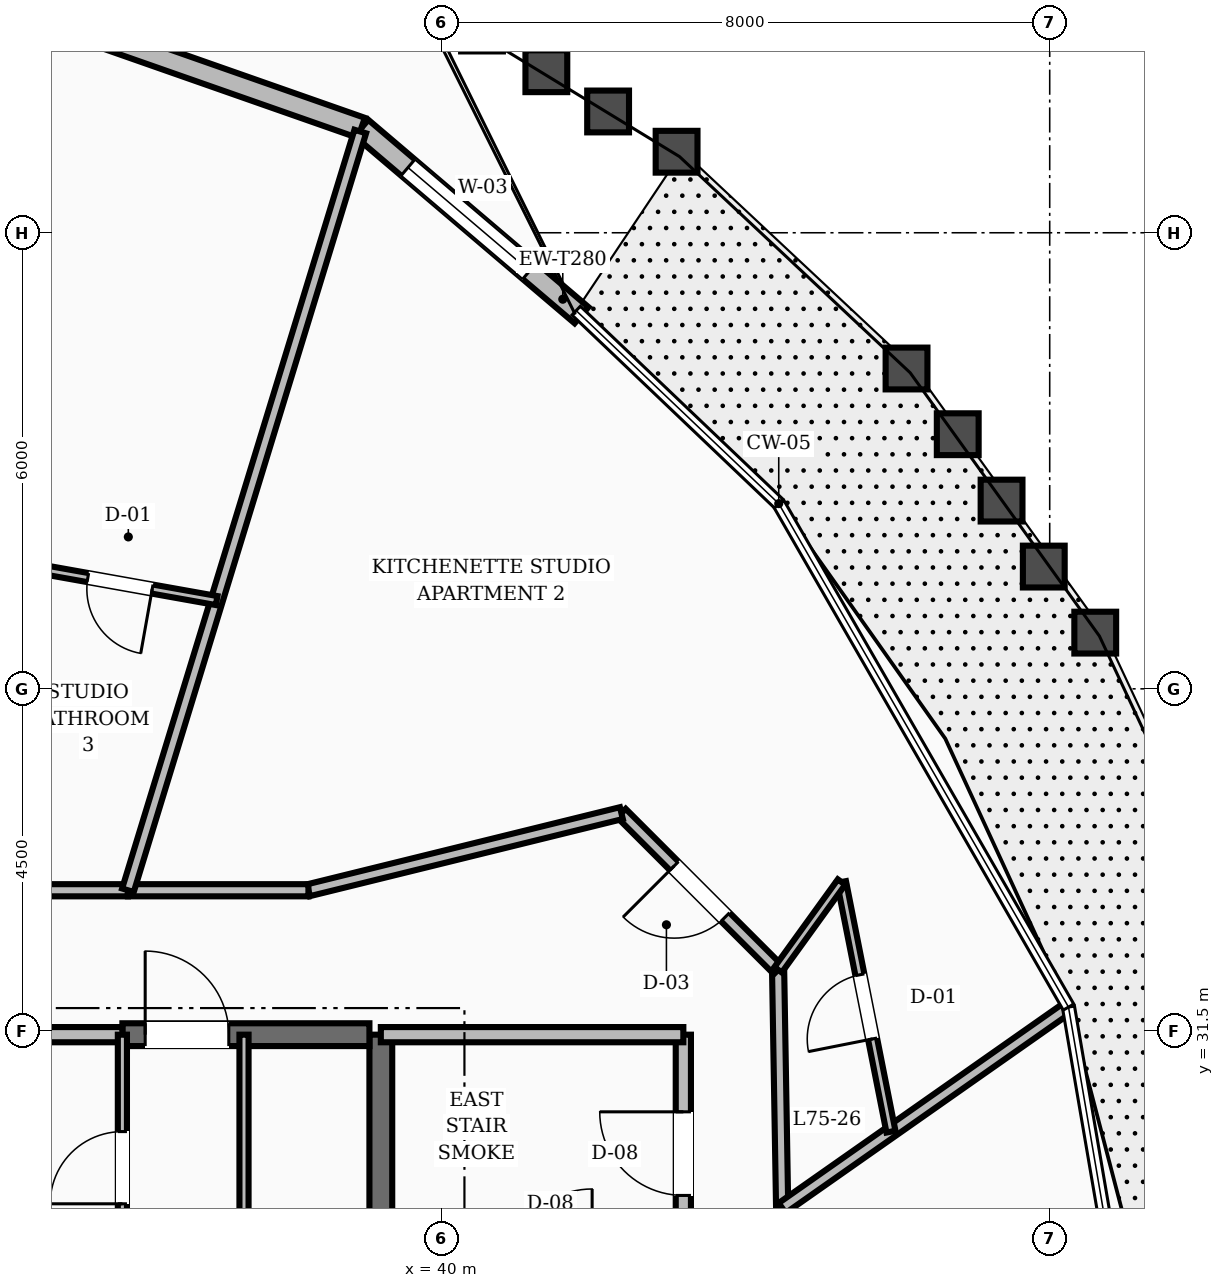
"""IFC4 building model, lengths in metres.
Left out: names, types, materials, properties, quantities, classifications, styles, units other than length and angle.
Written with IfcOpenShell. Run it as: python <this file> out.ifc"""

import sys

from ifc_helpers import new_model, si_unit, direction, frame, frame_2d, origin, place, context, subcontext, project, spatial, rectangle, extrude, element, fill, save


model = new_model("IFC4")
c1 = context("Model", 3, precision=1e-05, world=origin(), true_north=direction((0.0, 1.0)))
c2 = subcontext(c1, "Body", "Model", "MODEL_VIEW")
j1 = project(units=[si_unit("LENGTHUNIT", "METRE"), si_unit("PLANEANGLEUNIT", "RADIAN")], contexts=[c1])
p1 = place(None, origin())
s1 = spatial("IfcSite", under=j1, at=p1, CompositionType="ELEMENT")
p2 = place(p1, origin())
s2 = spatial("IfcBuilding", under=s1, at=p2, CompositionType="ELEMENT")
p3 = place(p2, frame((0.0, 0.0, 286.8)))
s3 = spatial("IfcBuildingStorey", under=s2, at=p3, CompositionType="ELEMENT", Elevation=286.8)
p4 = place(p3, frame((39.2, 25.15, 0.0), z_axis=(0.0, 0.0, 1.0), x_axis=(0.0, 1.0, 0.0)))
e1 = element("IfcWall", 1, at=p4, inside=s3, PredefinedType="SHEAR", context=c2, shape_type="SweptSolid", body=[
    extrude(rectangle(XDim=6.3, YDim=0.3, at=frame_2d((3.15, 0.0))), origin(), (0.0, 0.0, 1.0), 3.6),
])
p5 = place(p3, frame((35.8, 31.45, 0.0), z_axis=(0.0, 0.0, 1.0), x_axis=(1.0, 0.0, 0.0)))
e2 = element("IfcWall", 2, at=p5, inside=s3, PredefinedType="SHEAR", context=c2, shape_type="SweptSolid", body=[
    extrude(rectangle(XDim=3.25, YDim=0.3, at=frame_2d((1.625, 0.0))), origin(), (0.0, 0.0, 1.0), 3.6),
])
p6 = place(p5, frame((0.3, 0.0, 0.0)))
e3 = element("IfcOpeningElement", 3, at=p6, cuts=e2, PredefinedType="OPENING", context=c2, shape_type="SweptSolid", body=[
    extrude(rectangle(XDim=1.1, YDim=2.1, at=frame_2d((0.55, 1.05))), frame((0.0, 0.16, 0.0), z_axis=(0.0, -1.0, 0.0), x_axis=(1.0, 0.0, 0.0)), (0.0, 0.0, 1.0), 0.32),
])
p7 = place(p3, frame((41.84, 40.916, 0.0), z_axis=(0.0, 0.0, 1.0), x_axis=(-0.7617032154, 0.64792608502, 0.0)))
e4 = element("IfcWall", 4, at=p7, inside=s3, PredefinedType="STANDARD", context=c2, shape_type="SweptSolid", body=[
    extrude(rectangle(XDim=3.802, YDim=0.28, at=frame_2d((1.901, 0.0))), origin(), (0.0, 0.0, 1.0), 2.88),
])
p8 = place(p7, frame((0.897, 0.0, 0.8)))
e5 = element("IfcOpeningElement", 5, at=p8, cuts=e4, PredefinedType="OPENING", context=c2, shape_type="SweptSolid", body=[
    extrude(rectangle(XDim=2.1, YDim=1.65, at=frame_2d((1.05, 0.825))), frame((0.0, 0.15, 0.0), z_axis=(0.0, -1.0, 0.0), x_axis=(1.0, 0.0, 0.0)), (0.0, 0.0, 1.0), 0.3),
])
p9 = place(p3, frame((38.944, 43.38, 0.0), z_axis=(0.0, 0.0, 1.0), x_axis=(-0.94366932977, 0.33089000597, 0.0)))
e6 = element("IfcWall", 6, at=p9, inside=s3, PredefinedType="STANDARD", context=c2, shape_type="SweptSolid", body=[
    extrude(rectangle(XDim=3.607, YDim=0.28, at=frame_2d((1.804, 0.0))), origin(), (0.0, 0.0, 1.0), 2.88),
])
p10 = place(p3, frame((43.18, 28.32, 0.0), z_axis=(0.0, 0.0, 1.0), x_axis=(0.0, 1.0, 0.0)))
e7 = element("IfcWall", 7, at=p10, inside=s3, PredefinedType="SOLIDWALL", context=c2, shape_type="SweptSolid", body=[
    extrude(rectangle(XDim=3.13, YDim=0.2, at=frame_2d((1.565, 0.0))), origin(), (0.0, 0.0, 1.0), 2.87),
])
p11 = place(p10, frame((1.015, 0.0, 0.0)))
e8 = element("IfcOpeningElement", 8, at=p11, cuts=e7, PredefinedType="OPENING", context=c2, shape_type="SweptSolid", body=[
    extrude(rectangle(XDim=1.1, YDim=2.1, at=frame_2d((0.55, 1.05))), frame((0.0, 0.11, 0.0), z_axis=(0.0, -1.0, 0.0), x_axis=(1.0, 0.0, 0.0)), (0.0, 0.0, 1.0), 0.22),
])
p12 = place(p3, frame((39.2, 31.45, 0.0), z_axis=(0.0, 0.0, 1.0), x_axis=(1.0, 0.0, 0.0)))
e9 = element("IfcWall", 9, at=p12, inside=s3, PredefinedType="SOLIDWALL", context=c2, shape_type="SweptSolid", body=[
    extrude(rectangle(XDim=3.98, YDim=0.2, at=frame_2d((1.99, 0.0))), origin(), (0.0, 0.0, 1.0), 2.87),
])
p13 = place(p3, frame((28.2, 31.45, 0.0), z_axis=(0.0, 0.0, 1.0), x_axis=(1.0, 0.0, 0.0)))
e10 = element("IfcWall", 10, at=p13, inside=s3, PredefinedType="SOLIDWALL", context=c2, shape_type="SweptSolid", body=[
    extrude(rectangle(XDim=7.6, YDim=0.2, at=frame_2d((3.8, 0.0))), origin(), (0.0, 0.0, 1.0), 2.87),
])
p14 = place(p3, frame((35.8, 27.95, 0.0), z_axis=(0.0, 0.0, 1.0), x_axis=(0.0, 1.0, 0.0)))
e11 = element("IfcWall", 11, at=p14, inside=s3, PredefinedType="PARTITIONING", context=c2, shape_type="SweptSolid", body=[
    extrude(rectangle(XDim=3.5, YDim=0.12, at=frame_2d((1.75, 0.0))), origin(), (0.0, 0.0, 1.0), 2.87),
])
p15 = place(p14, frame((1.275, 0.0, 0.0)))
e12 = element("IfcOpeningElement", 12, at=p15, cuts=e11, PredefinedType="OPENING", context=c2, shape_type="SweptSolid", body=[
    extrude(rectangle(XDim=0.95, YDim=2.1, at=frame_2d((0.475, 1.05))), frame((0.0, 0.07, 0.0), z_axis=(0.0, -1.0, 0.0), x_axis=(1.0, 0.0, 0.0)), (0.0, 0.0, 1.0), 0.14),
])
p16 = place(p3, frame((37.4, 25.25, 0.0), z_axis=(0.0, 0.0, 1.0), x_axis=(0.0, 1.0, 0.0)))
e13 = element("IfcWall", 13, at=p16, inside=s3, PredefinedType="PARTITIONING", context=c2, shape_type="SweptSolid", body=[
    extrude(rectangle(XDim=6.2, YDim=0.12, at=frame_2d((3.1, 0.0))), origin(), (0.0, 0.0, 1.0), 2.87),
])
p17 = place(p16, frame((2.625, 0.0, 0.0)))
e14 = element("IfcOpeningElement", 14, at=p17, cuts=e13, PredefinedType="OPENING", context=c2, shape_type="SweptSolid", body=[
    extrude(rectangle(XDim=0.95, YDim=2.1, at=frame_2d((0.475, 1.05))), frame((0.0, 0.07, 0.0), z_axis=(0.0, -1.0, 0.0), x_axis=(1.0, 0.0, 0.0)), (0.0, 0.0, 1.0), 0.14),
])
p18 = place(p3, frame((44.48, 29.169, 0.0), z_axis=(0.0, 0.0, 1.0), x_axis=(-0.016981035134, 0.999855811828, 0.0)))
e15 = element("IfcWall", 15, at=p18, inside=s3, PredefinedType="SOLIDWALL", context=c2, shape_type="SweptSolid", body=[
    extrude(rectangle(XDim=3.134, YDim=0.16, at=frame_2d((1.567, 0.0))), origin(), (0.0, 0.0, 1.0), 2.87),
])
p19 = place(p3, frame((44.427, 32.303, 0.0), z_axis=(0.0, 0.0, 1.0), x_axis=(-0.707106781187, 0.707106781187, 0.0)))
e16 = element("IfcWall", 16, at=p19, inside=s3, PredefinedType="SOLIDWALL", context=c2, shape_type="SweptSolid", body=[
    extrude(rectangle(XDim=2.916, YDim=0.16, at=frame_2d((1.458, 0.0))), origin(), (0.0, 0.0, 1.0), 2.87),
])
p20 = place(p19, frame((0.983, 0.0, 0.0)))
e17 = element("IfcOpeningElement", 17, at=p20, cuts=e16, PredefinedType="OPENING", context=c2, shape_type="SweptSolid", body=[
    extrude(rectangle(XDim=0.95, YDim=2.1, at=frame_2d((0.475, 1.05))), frame((0.0, 0.09, 0.0), z_axis=(0.0, -1.0, 0.0), x_axis=(1.0, 0.0, 0.0)), (0.0, 0.0, 1.0), 0.18),
])
p21 = place(p3, frame((42.365, 34.365, 0.0), z_axis=(0.0, 0.0, 1.0), x_axis=(-0.970939799552, -0.239323850978, 0.0)))
e18 = element("IfcWall", 18, at=p21, inside=s3, PredefinedType="SOLIDWALL", context=c2, shape_type="SweptSolid", body=[
    extrude(rectangle(XDim=4.241, YDim=0.16, at=frame_2d((2.12, 0.0))), origin(), (0.0, 0.0, 1.0), 2.87),
])
p22 = place(p3, frame((38.248, 33.35, 0.0), z_axis=(0.0, 0.0, 1.0), x_axis=(-1.0, 0.0, 0.0)))
e19 = element("IfcWall", 19, at=p22, inside=s3, PredefinedType="SOLIDWALL", context=c2, shape_type="SweptSolid", body=[
    extrude(rectangle(XDim=2.375, YDim=0.16, at=frame_2d((1.188, 0.0))), origin(), (0.0, 0.0, 1.0), 2.87),
])
p23 = place(p3, frame((35.873, 33.35, 0.0), z_axis=(0.0, 0.0, 1.0), x_axis=(-1.0, 0.0, 0.0)))
e20 = element("IfcWall", 20, at=p23, inside=s3, PredefinedType="SOLIDWALL", context=c2, shape_type="SweptSolid", body=[
    extrude(rectangle(XDim=2.013, YDim=0.16, at=frame_2d((1.006, 0.0))), origin(), (0.0, 0.0, 1.0), 2.87),
])
p24 = place(p3, frame((44.48, 29.169, 0.0), z_axis=(0.0, 0.0, 1.0), x_axis=(0.818578812532, 0.574394226706, 0.0)))
e21 = element("IfcWall", 21, at=p24, inside=s3, PredefinedType="SOLIDWALL", context=c2, shape_type="SweptSolid", body=[
    extrude(rectangle(XDim=4.552, YDim=0.16, at=frame_2d((2.276, 0.0))), origin(), (0.0, 0.0, 1.0), 2.87),
])
p25 = place(p3, frame((45.912, 30.174, 0.0), z_axis=(0.0, 0.0, 1.0), x_axis=(-0.194334852928, 0.980935250125, 0.0)))
e22 = element("IfcWall", 22, at=p25, inside=s3, PredefinedType="PARTITIONING", context=c2, shape_type="SweptSolid", body=[
    extrude(rectangle(XDim=3.348, YDim=0.12, at=frame_2d((1.674, 0.0))), origin(), (0.0, 0.0, 1.0), 2.87),
])
p26 = place(p25, frame((1.244, 0.0, 0.0)))
e23 = element("IfcOpeningElement", 23, at=p26, cuts=e22, PredefinedType="OPENING", context=c2, shape_type="SweptSolid", body=[
    extrude(rectangle(XDim=0.86, YDim=2.1, at=frame_2d((0.43, 1.05))), frame((0.0, 0.07, 0.0), z_axis=(0.0, -1.0, 0.0), x_axis=(1.0, 0.0, 0.0)), (0.0, 0.0, 1.0), 0.14),
])
p27 = place(p3, frame((44.427, 32.303, 0.0), z_axis=(0.0, 0.0, 1.0), x_axis=(0.585509322452, 0.810665672964, 0.0)))
e24 = element("IfcWall", 24, at=p27, inside=s3, PredefinedType="PARTITIONING", context=c2, shape_type="SweptSolid", body=[
    extrude(rectangle(XDim=1.425, YDim=0.12, at=frame_2d((0.712, 0.0))), origin(), (0.0, 0.0, 1.0), 2.87),
])
p28 = place(p3, frame((35.873, 33.35, 0.0), z_axis=(0.0, 0.0, 1.0), x_axis=(0.292803730525, 0.956172565696, 0.0)))
e25 = element("IfcWall", 25, at=p28, inside=s3, PredefinedType="SOLIDWALL", context=c2, shape_type="SweptSolid", body=[
    extrude(rectangle(XDim=10.439, YDim=0.16, at=frame_2d((5.22, 0.0))), origin(), (0.0, 0.0, 1.0), 2.87),
])
p29 = place(p3, frame((37.04, 37.161, 0.0), z_axis=(0.0, 0.0, 1.0), x_axis=(-0.984445687122, 0.175689183236, 0.0)))
e26 = element("IfcWall", 26, at=p29, inside=s3, PredefinedType="PARTITIONING", context=c2, shape_type="SweptSolid", body=[
    extrude(rectangle(XDim=2.582, YDim=0.12, at=frame_2d((1.291, 0.0))), origin(), (0.0, 0.0, 1.0), 2.87),
])
p30 = place(p29, frame((0.861, 0.0, 0.0)))
e27 = element("IfcOpeningElement", 27, at=p30, cuts=e26, PredefinedType="OPENING", context=c2, shape_type="SweptSolid", body=[
    extrude(rectangle(XDim=0.86, YDim=2.1, at=frame_2d((0.43, 1.05))), frame((0.0, 0.07, 0.0), z_axis=(0.0, -1.0, 0.0), x_axis=(1.0, 0.0, 0.0)), (0.0, 0.0, 1.0), 0.14),
])
p31 = place(p8, origin())
e28 = element("IfcWindow", 28, at=p31, inside=s3, PartitioningType="SINGLE_PANEL", PredefinedType="WINDOW", context=c2, shape_type="SweptSolid", body=[
    extrude(rectangle(XDim=2.1, YDim=1.65, at=frame_2d((1.05, 0.825))), frame((0.0, 0.03, 0.0), z_axis=(0.0, -1.0, 0.0), x_axis=(1.0, 0.0, 0.0)), (0.0, 0.0, 1.0), 0.06),
])
fill(e5, e28)
p32 = place(p11, origin())
e29 = element("IfcDoor", 29, at=p32, inside=s3, OperationType="SINGLE_SWING_RIGHT", PredefinedType="DOOR", context=c2, shape_type="SweptSolid", body=[
    extrude(rectangle(XDim=1.1, YDim=2.1, at=frame_2d((0.55, 1.05))), frame((0.0, 0.025, 0.0), z_axis=(0.0, -1.0, 0.0), x_axis=(1.0, 0.0, 0.0)), (0.0, 0.0, 1.0), 0.05),
])
fill(e8, e29)
p33 = place(p6, origin())
e30 = element("IfcDoor", 30, at=p33, inside=s3, OperationType="SINGLE_SWING_LEFT", PredefinedType="DOOR", context=c2, shape_type="SweptSolid", body=[
    extrude(rectangle(XDim=1.1, YDim=2.1, at=frame_2d((0.55, 1.05))), frame((0.0, 0.025, 0.0), z_axis=(0.0, -1.0, 0.0), x_axis=(1.0, 0.0, 0.0)), (0.0, 0.0, 1.0), 0.05),
])
fill(e3, e30)
p34 = place(p15, origin())
e31 = element("IfcDoor", 31, at=p34, inside=s3, OperationType="SINGLE_SWING_LEFT", PredefinedType="DOOR", context=c2, shape_type="SweptSolid", body=[
    extrude(rectangle(XDim=0.95, YDim=2.1, at=frame_2d((0.475, 1.05))), frame((0.0, 0.025, 0.0), z_axis=(0.0, -1.0, 0.0), x_axis=(1.0, 0.0, 0.0)), (0.0, 0.0, 1.0), 0.05),
])
fill(e12, e31)
p35 = place(p26, origin())
e32 = element("IfcDoor", 32, at=p35, inside=s3, OperationType="SINGLE_SWING_LEFT", PredefinedType="DOOR", context=c2, shape_type="SweptSolid", body=[
    extrude(rectangle(XDim=0.86, YDim=2.1, at=frame_2d((0.43, 1.05))), frame((0.0, 0.025, 0.0), z_axis=(0.0, -1.0, 0.0), x_axis=(1.0, 0.0, 0.0)), (0.0, 0.0, 1.0), 0.05),
])
fill(e23, e32)
p36 = place(p20, origin())
e33 = element("IfcDoor", 33, at=p36, inside=s3, OperationType="SINGLE_SWING_RIGHT", PredefinedType="DOOR", context=c2, shape_type="SweptSolid", body=[
    extrude(rectangle(XDim=0.95, YDim=2.1, at=frame_2d((0.475, 1.05))), frame((0.0, 0.025, 0.0), z_axis=(0.0, -1.0, 0.0), x_axis=(1.0, 0.0, 0.0)), (0.0, 0.0, 1.0), 0.05),
])
fill(e17, e33)
p37 = place(p30, origin())
e34 = element("IfcDoor", 34, at=p37, inside=s3, OperationType="SINGLE_SWING_LEFT", PredefinedType="DOOR", context=c2, shape_type="SweptSolid", body=[
    extrude(rectangle(XDim=0.86, YDim=2.1, at=frame_2d((0.43, 1.05))), frame((0.0, 0.025, 0.0), z_axis=(0.0, -1.0, 0.0), x_axis=(1.0, 0.0, 0.0)), (0.0, 0.0, 1.0), 0.05),
])
fill(e27, e34)
save(model, sys.argv[1])
